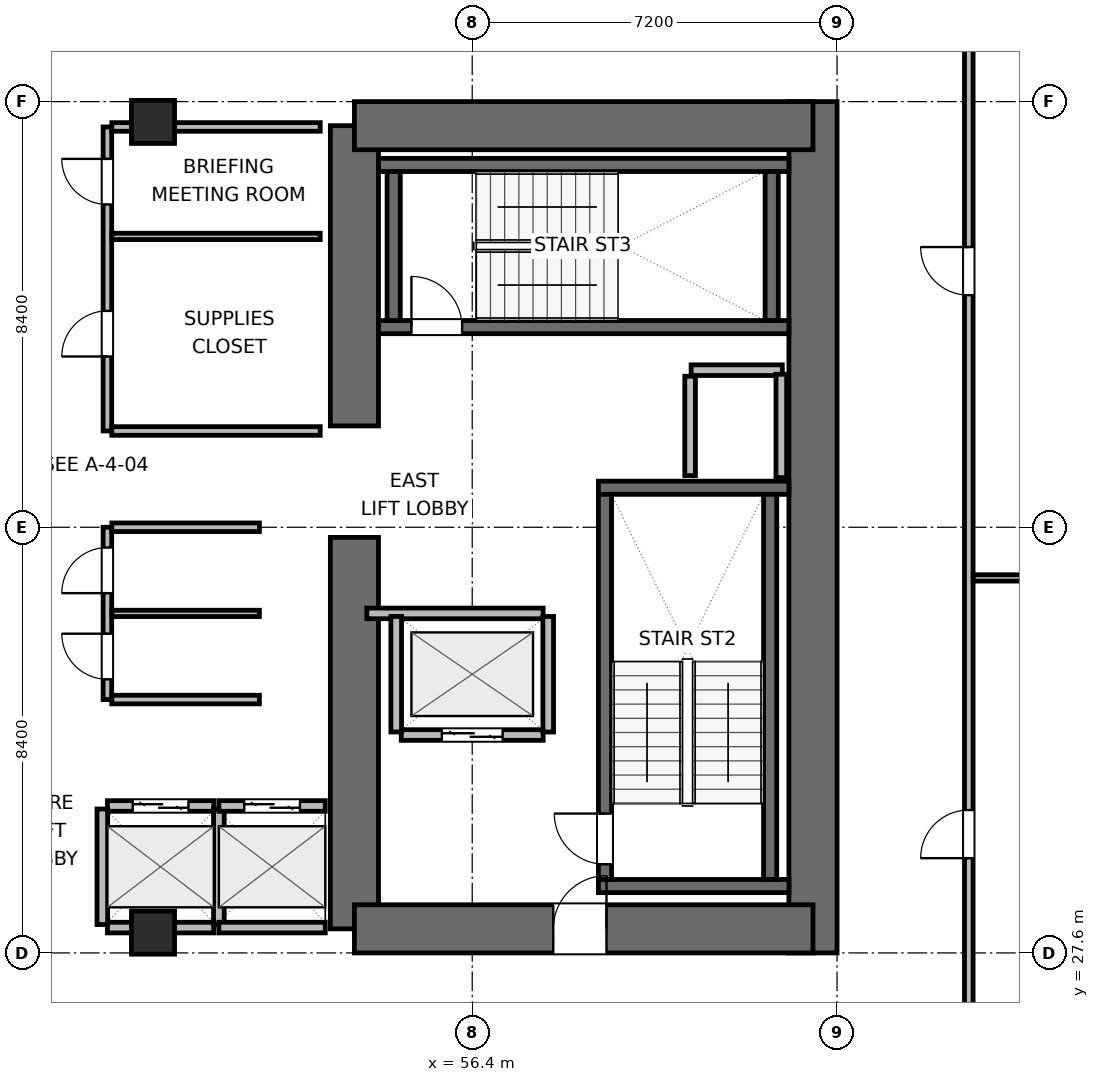
"""IFC4 building model, lengths in metres.
Left out: names, types, materials, properties, quantities, classifications, styles, units other than length and angle.
Written with IfcOpenShell. Run it as: python <this file> out.ifc"""

import sys

from ifc_helpers import new_model, si_unit, direction, frame, frame_2d, origin, origin_2d, place, context, subcontext, project, spatial, rectangle, extrude, element, fill, save


model = new_model("IFC4")
c1 = context("Model", 3, precision=1e-05, world=origin(), true_north=direction((0.0, 1.0)))
c2 = subcontext(c1, "Body", "Model", "MODEL_VIEW")
j1 = project(units=[si_unit("LENGTHUNIT", "METRE"), si_unit("PLANEANGLEUNIT", "RADIAN")], contexts=[c1])
p1 = place(None, origin())
s1 = spatial("IfcSite", under=j1, at=p1, CompositionType="ELEMENT")
p2 = place(p1, origin())
s2 = spatial("IfcBuilding", under=s1, at=p2, CompositionType="ELEMENT")
p3 = place(p2, frame((0.0, 0.0, 52.8)))
s3 = spatial("IfcBuildingStorey", under=s2, at=p3, CompositionType="ELEMENT", Elevation=52.8)
p4 = place(p3, frame((54.075, 28.075, 0.0), z_axis=(0.0, 0.0, 1.0), x_axis=(0.0, 1.0, 0.0)))
e1 = element("IfcWall", 1, at=p4, inside=s3, PredefinedType="SHEAR", context=c2, shape_type="SweptSolid", body=[
    extrude(rectangle(XDim=7.725, YDim=0.95, at=frame_2d((3.863, 0.0))), origin(), (0.0, 0.0, 1.0), 3.9),
])
p5 = place(p3, frame((54.075, 38.0, 0.0), z_axis=(0.0, 0.0, 1.0), x_axis=(0.0, 1.0, 0.0)))
e2 = element("IfcWall", 2, at=p5, inside=s3, PredefinedType="SHEAR", context=c2, shape_type="SweptSolid", body=[
    extrude(rectangle(XDim=5.925, YDim=0.95, at=frame_2d((2.962, 0.0))), origin(), (0.0, 0.0, 1.0), 3.9),
])
p6 = place(p3, frame((63.125, 27.6, 0.0), z_axis=(0.0, 0.0, 1.0), x_axis=(0.0, 1.0, 0.0)))
e3 = element("IfcWall", 3, at=p6, inside=s3, PredefinedType="SHEAR", context=c2, shape_type="SweptSolid", body=[
    extrude(rectangle(XDim=16.8, YDim=0.95, at=frame_2d((8.4, 0.0))), origin(), (0.0, 0.0, 1.0), 3.9),
])
p7 = place(p3, frame((54.075, 28.075, 0.0), z_axis=(0.0, 0.0, 1.0), x_axis=(1.0, 0.0, 0.0)))
e4 = element("IfcWall", 4, at=p7, inside=s3, PredefinedType="SHEAR", context=c2, shape_type="SweptSolid", body=[
    extrude(rectangle(XDim=9.05, YDim=0.95, at=frame_2d((4.525, 0.0))), origin(), (0.0, 0.0, 1.0), 3.9),
])
p8 = place(p7, frame((3.925, 0.0, 0.0)))
e5 = element("IfcOpeningElement", 5, at=p8, cuts=e4, PredefinedType="OPENING", context=c2, shape_type="SweptSolid", body=[
    extrude(rectangle(XDim=1.05, YDim=2.04, at=frame_2d((0.525, 1.02))), frame((0.0, 0.485, 0.0), z_axis=(0.0, -1.0, 0.0), x_axis=(1.0, 0.0, 0.0)), (0.0, 0.0, 1.0), 0.97),
])
p9 = place(p3, frame((54.075, 43.925, 0.0), z_axis=(0.0, 0.0, 1.0), x_axis=(1.0, 0.0, 0.0)))
e6 = element("IfcWall", 6, at=p9, inside=s3, PredefinedType="SHEAR", context=c2, shape_type="SweptSolid", body=[
    extrude(rectangle(XDim=9.05, YDim=0.95, at=frame_2d((4.525, 0.0))), origin(), (0.0, 0.0, 1.0), 3.9),
])
for number, where, z_axis, x_axis in (
    (7, (58.89, 28.92, 0.0), (0.0, 0.0, 1.0), (1.0, 0.0, 0.0)),
    (8, (58.89, 36.78, 0.0), (0.0, 0.0, 1.0), (1.0, 0.0, 0.0)),
):
    element("IfcWall", number, at=place(p3, frame(where, z_axis=z_axis, x_axis=x_axis)), inside=s3, PredefinedType="SHEAR", context=c2, shape_type="SweptSolid", body=[
        extrude(rectangle(XDim=3.76, YDim=0.26, at=frame_2d((1.88, 0.0))), origin(), (0.0, 0.0, 1.0), 3.9),
    ])
p10 = place(p3, frame((59.02, 29.05, 0.0), z_axis=(0.0, 0.0, 1.0), x_axis=(0.0, 1.0, 0.0)))
e9 = element("IfcWall", 9, at=p10, inside=s3, PredefinedType="SHEAR", context=c2, shape_type="SweptSolid", body=[
    extrude(rectangle(XDim=7.6, YDim=0.26, at=frame_2d((3.8, 0.0))), origin(), (0.0, 0.0, 1.0), 3.9),
])
p11 = place(p10, frame((0.3, 0.0, 0.0)))
e10 = element("IfcOpeningElement", 10, at=p11, cuts=e9, PredefinedType="OPENING", context=c2, shape_type="SweptSolid", body=[
    extrude(rectangle(XDim=1.0, YDim=2.04, at=frame_2d((0.5, 1.02))), frame((0.0, 0.14, 0.0), z_axis=(0.0, -1.0, 0.0), x_axis=(1.0, 0.0, 0.0)), (0.0, 0.0, 1.0), 0.28),
])
p12 = place(p3, frame((62.28, 29.05, 0.0), z_axis=(0.0, 0.0, 1.0), x_axis=(0.0, 1.0, 0.0)))
e11 = element("IfcWall", 11, at=p12, inside=s3, PredefinedType="SHEAR", context=c2, shape_type="SweptSolid", body=[
    extrude(rectangle(XDim=7.6, YDim=0.26, at=frame_2d((3.8, 0.0))), origin(), (0.0, 0.0, 1.0), 3.9),
])
p13 = place(p3, frame((54.55, 39.95, 0.0), z_axis=(0.0, 0.0, 1.0), x_axis=(1.0, 0.0, 0.0)))
e12 = element("IfcWall", 12, at=p13, inside=s3, PredefinedType="SHEAR", context=c2, shape_type="SweptSolid", body=[
    extrude(rectangle(XDim=8.1, YDim=0.26, at=frame_2d((4.05, 0.0))), origin(), (0.0, 0.0, 1.0), 3.9),
])
p14 = place(p13, frame((0.65, 0.0, 0.0)))
e13 = element("IfcOpeningElement", 13, at=p14, cuts=e12, PredefinedType="OPENING", context=c2, shape_type="SweptSolid", body=[
    extrude(rectangle(XDim=1.0, YDim=2.04, at=frame_2d((0.5, 1.02))), frame((0.0, 0.14, 0.0), z_axis=(0.0, -1.0, 0.0), x_axis=(1.0, 0.0, 0.0)), (0.0, 0.0, 1.0), 0.28),
])
p15 = place(p3, frame((54.55, 43.15, 0.0), z_axis=(0.0, 0.0, 1.0), x_axis=(1.0, 0.0, 0.0)))
e14 = element("IfcWall", 14, at=p15, inside=s3, PredefinedType="SHEAR", context=c2, shape_type="SweptSolid", body=[
    extrude(rectangle(XDim=8.1, YDim=0.26, at=frame_2d((4.05, 0.0))), origin(), (0.0, 0.0, 1.0), 3.9),
])
for number, where, z_axis, x_axis in (
    (15, (54.85, 40.08, 0.0), (0.0, 0.0, 1.0), (0.0, 1.0, 0.0)),
    (16, (62.31, 40.08, 0.0), (0.0, 0.0, 1.0), (0.0, 1.0, 0.0)),
):
    element("IfcWall", number, at=place(p3, frame(where, z_axis=z_axis, x_axis=x_axis)), inside=s3, PredefinedType="SHEAR", context=c2, shape_type="SweptSolid", body=[
        extrude(rectangle(XDim=2.94, YDim=0.26, at=frame_2d((1.47, 0.0))), origin(), (0.0, 0.0, 1.0), 3.9),
    ])
for number, where, z_axis, x_axis in (
    (17, (50.1, 28.0, 0.0), (0.0, 0.0, 1.0), (1.0, 0.0, 0.0)),
    (18, (50.1, 44.0, 0.0), (0.0, 0.0, 1.0), (1.0, 0.0, 0.0)),
):
    element("IfcColumn", number, at=place(p3, frame(where, z_axis=z_axis, x_axis=x_axis)), inside=s3, PredefinedType="COLUMN", context=c2, shape_type="SweptSolid", body=[
        extrude(rectangle(XDim=0.85, YDim=0.85, at=origin_2d()), origin(), (0.0, 0.0, 1.0), 3.9),
    ])
p16 = place(p3, frame((60.72, 39.1, 0.0), z_axis=(0.0, 0.0, 1.0), x_axis=(1.0, 0.0, 0.0)))
e19 = element("IfcWall", 19, at=p16, inside=s3, PredefinedType="PARTITIONING", context=c2, shape_type="SweptSolid", body=[
    extrude(rectangle(XDim=1.8, YDim=0.21, at=frame_2d((0.9, 0.0))), origin(), (0.0, 0.0, 1.0), 3.64),
])
p17 = place(p3, frame((60.7, 37.02, 0.0), z_axis=(0.0, 0.0, 1.0), x_axis=(0.0, 1.0, 0.0)))
e20 = element("IfcWall", 20, at=p17, inside=s3, PredefinedType="PARTITIONING", context=c2, shape_type="SweptSolid", body=[
    extrude(rectangle(XDim=1.96, YDim=0.21, at=frame_2d((0.98, 0.0))), origin(), (0.0, 0.0, 1.0), 3.64),
])
p18 = place(p3, frame((62.5, 36.98, 0.0), z_axis=(0.0, 0.0, 1.0), x_axis=(0.0, 1.0, 0.0)))
e21 = element("IfcWall", 21, at=p18, inside=s3, PredefinedType="PARTITIONING", context=c2, shape_type="SweptSolid", body=[
    extrude(rectangle(XDim=2.04, YDim=0.21, at=frame_2d((1.02, 0.0))), origin(), (0.0, 0.0, 1.0), 3.64),
])
p19 = place(p3, frame((55.0, 31.9, 0.0), z_axis=(0.0, 0.0, 1.0), x_axis=(1.0, 0.0, 0.0)))
e22 = element("IfcWall", 22, at=p19, inside=s3, PredefinedType="PARTITIONING", context=c2, shape_type="SweptSolid", body=[
    extrude(rectangle(XDim=2.8, YDim=0.21, at=frame_2d((1.4, 0.0))), origin(), (0.0, 0.0, 1.0), 3.64),
])
p20 = place(p19, frame((0.8, 0.0, 0.0)))
e23 = element("IfcOpeningElement", 23, at=p20, cuts=e22, PredefinedType="OPENING", context=c2, shape_type="SweptSolid", body=[
    extrude(rectangle(XDim=1.2, YDim=2.04, at=frame_2d((0.6, 1.02))), frame((0.0, 0.115, 0.0), z_axis=(0.0, -1.0, 0.0), x_axis=(1.0, 0.0, 0.0)), (0.0, 0.0, 1.0), 0.23),
])
p21 = place(p3, frame((54.32, 34.3, 0.0), z_axis=(0.0, 0.0, 1.0), x_axis=(1.0, 0.0, 0.0)))
e24 = element("IfcWall", 24, at=p21, inside=s3, PredefinedType="PARTITIONING", context=c2, shape_type="SweptSolid", body=[
    extrude(rectangle(XDim=3.48, YDim=0.21, at=frame_2d((1.74, 0.0))), origin(), (0.0, 0.0, 1.0), 3.64),
])
for number, where, z_axis, x_axis in (
    (25, (54.9, 31.96, 0.0), (0.0, 0.0, 1.0), (0.0, 1.0, 0.0)),
    (26, (57.9, 31.96, 0.0), (0.0, 0.0, 1.0), (0.0, 1.0, 0.0)),
):
    element("IfcWall", number, at=place(p3, frame(where, z_axis=z_axis, x_axis=x_axis)), inside=s3, PredefinedType="PARTITIONING", context=c2, shape_type="SweptSolid", body=[
        extrude(rectangle(XDim=2.28, YDim=0.21, at=frame_2d((1.14, 0.0))), origin(), (0.0, 0.0, 1.0), 3.64),
    ])
p22 = place(p3, frame((49.2, 30.5, 0.0), z_axis=(0.0, 0.0, 1.0), x_axis=(1.0, 0.0, 0.0)))
e27 = element("IfcWall", 27, at=p22, inside=s3, PredefinedType="PARTITIONING", context=c2, shape_type="SweptSolid", body=[
    extrude(rectangle(XDim=2.1, YDim=0.21, at=frame_2d((1.05, 0.0))), origin(), (0.0, 0.0, 1.0), 3.64),
])
p23 = place(p22, frame((0.5, 0.0, 0.0)))
e28 = element("IfcOpeningElement", 28, at=p23, cuts=e27, PredefinedType="OPENING", context=c2, shape_type="SweptSolid", body=[
    extrude(rectangle(XDim=1.1, YDim=2.04, at=frame_2d((0.55, 1.02))), frame((0.0, 0.115, 0.0), z_axis=(0.0, -1.0, 0.0), x_axis=(1.0, 0.0, 0.0)), (0.0, 0.0, 1.0), 0.23),
])
p24 = place(p3, frame((49.2, 28.1, 0.0), z_axis=(0.0, 0.0, 1.0), x_axis=(1.0, 0.0, 0.0)))
e29 = element("IfcWall", 29, at=p24, inside=s3, PredefinedType="PARTITIONING", context=c2, shape_type="SweptSolid", body=[
    extrude(rectangle(XDim=2.1, YDim=0.21, at=frame_2d((1.05, 0.0))), origin(), (0.0, 0.0, 1.0), 2.525),
])
for number, where, z_axis, x_axis in (
    (30, (49.1, 28.16, 0.0), (0.0, 0.0, 1.0), (0.0, 1.0, 0.0)),
    (31, (51.4, 28.16, 0.0), (0.0, 0.0, 1.0), (0.0, 1.0, 0.0)),
):
    element("IfcWall", number, at=place(p3, frame(where, z_axis=z_axis, x_axis=x_axis)), inside=s3, PredefinedType="PARTITIONING", context=c2, shape_type="SweptSolid", body=[
        extrude(rectangle(XDim=2.28, YDim=0.21, at=frame_2d((1.14, 0.0))), origin(), (0.0, 0.0, 1.0), 3.64),
    ])
p25 = place(p3, frame((51.4, 30.5, 0.0), z_axis=(0.0, 0.0, 1.0), x_axis=(1.0, 0.0, 0.0)))
e32 = element("IfcWall", 32, at=p25, inside=s3, PredefinedType="PARTITIONING", context=c2, shape_type="SweptSolid", body=[
    extrude(rectangle(XDim=2.1, YDim=0.21, at=frame_2d((1.05, 0.0))), origin(), (0.0, 0.0, 1.0), 3.64),
])
p26 = place(p25, frame((0.5, 0.0, 0.0)))
e33 = element("IfcOpeningElement", 33, at=p26, cuts=e32, PredefinedType="OPENING", context=c2, shape_type="SweptSolid", body=[
    extrude(rectangle(XDim=1.1, YDim=2.04, at=frame_2d((0.55, 1.02))), frame((0.0, 0.115, 0.0), z_axis=(0.0, -1.0, 0.0), x_axis=(1.0, 0.0, 0.0)), (0.0, 0.0, 1.0), 0.23),
])
p27 = place(p3, frame((51.4, 28.1, 0.0), z_axis=(0.0, 0.0, 1.0), x_axis=(1.0, 0.0, 0.0)))
e34 = element("IfcWall", 34, at=p27, inside=s3, PredefinedType="PARTITIONING", context=c2, shape_type="SweptSolid", body=[
    extrude(rectangle(XDim=2.1, YDim=0.21, at=frame_2d((1.05, 0.0))), origin(), (0.0, 0.0, 1.0), 2.525),
])
p28 = place(p3, frame((49.2, 32.6, 0.0), z_axis=(0.0, 0.0, 1.0), x_axis=(0.0, 1.0, 0.0)))
e35 = element("IfcWall", 35, at=p28, inside=s3, PredefinedType="PARTITIONING", context=c2, shape_type="SweptSolid", body=[
    extrude(rectangle(XDim=3.4, YDim=0.17, at=frame_2d((1.7, 0.0))), origin(), (0.0, 0.0, 1.0), 3.64),
])
p29 = place(p28, frame((0.4, 0.0, 0.0)))
e36 = element("IfcOpeningElement", 36, at=p29, cuts=e35, PredefinedType="OPENING", context=c2, shape_type="SweptSolid", body=[
    extrude(rectangle(XDim=0.9, YDim=2.02, at=frame_2d((0.45, 1.01))), frame((0.0, 0.095, 0.0), z_axis=(0.0, -1.0, 0.0), x_axis=(1.0, 0.0, 0.0)), (0.0, 0.0, 1.0), 0.19),
])
p30 = place(p28, frame((2.1, 0.0, 0.0)))
e37 = element("IfcOpeningElement", 37, at=p30, cuts=e35, PredefinedType="OPENING", context=c2, shape_type="SweptSolid", body=[
    extrude(rectangle(XDim=0.9, YDim=2.02, at=frame_2d((0.45, 1.01))), frame((0.0, 0.095, 0.0), z_axis=(0.0, -1.0, 0.0), x_axis=(1.0, 0.0, 0.0)), (0.0, 0.0, 1.0), 0.19),
])
for number, where, z_axis, x_axis in (
    (38, (49.287, 32.6, 0.0), (0.0, 0.0, 1.0), (1.0, 0.0, 0.0)),
    (39, (49.287, 36.0, 0.0), (0.0, 0.0, 1.0), (1.0, 0.0, 0.0)),
):
    element("IfcWall", number, at=place(p3, frame(where, z_axis=z_axis, x_axis=x_axis)), inside=s3, PredefinedType="PARTITIONING", context=c2, shape_type="SweptSolid", body=[
        extrude(rectangle(XDim=2.913, YDim=0.17, at=frame_2d((1.457, 0.0))), origin(), (0.0, 0.0, 1.0), 3.64),
    ])
p31 = place(p3, frame((49.287, 34.3, 0.0), z_axis=(0.0, 0.0, 1.0), x_axis=(1.0, 0.0, 0.0)))
e40 = element("IfcWall", 40, at=p31, inside=s3, PredefinedType="PARTITIONING", context=c2, shape_type="SweptSolid", body=[
    extrude(rectangle(XDim=2.913, YDim=0.125, at=frame_2d((1.457, 0.0))), origin(), (0.0, 0.0, 1.0), 3.64),
])
p32 = place(p3, frame((49.2, 37.9, 0.0), z_axis=(0.0, 0.0, 1.0), x_axis=(0.0, 1.0, 0.0)))
e41 = element("IfcWall", 41, at=p32, inside=s3, PredefinedType="PARTITIONING", context=c2, shape_type="SweptSolid", body=[
    extrude(rectangle(XDim=6.0, YDim=0.17, at=frame_2d((3.0, 0.0))), origin(), (0.0, 0.0, 1.0), 3.64),
])
p33 = place(p32, frame((1.47, 0.0, 0.0)))
e42 = element("IfcOpeningElement", 42, at=p33, cuts=e41, PredefinedType="OPENING", context=c2, shape_type="SweptSolid", body=[
    extrude(rectangle(XDim=0.9, YDim=2.02, at=frame_2d((0.45, 1.01))), frame((0.0, 0.095, 0.0), z_axis=(0.0, -1.0, 0.0), x_axis=(1.0, 0.0, 0.0)), (0.0, 0.0, 1.0), 0.19),
])
p34 = place(p32, frame((4.47, 0.0, 0.0)))
e43 = element("IfcOpeningElement", 43, at=p34, cuts=e41, PredefinedType="OPENING", context=c2, shape_type="SweptSolid", body=[
    extrude(rectangle(XDim=0.9, YDim=2.02, at=frame_2d((0.45, 1.01))), frame((0.0, 0.095, 0.0), z_axis=(0.0, -1.0, 0.0), x_axis=(1.0, 0.0, 0.0)), (0.0, 0.0, 1.0), 0.19),
])
p35 = place(p3, frame((49.287, 37.9, 0.0), z_axis=(0.0, 0.0, 1.0), x_axis=(1.0, 0.0, 0.0)))
e44 = element("IfcWall", 44, at=p35, inside=s3, PredefinedType="PARTITIONING", context=c2, shape_type="SweptSolid", body=[
    extrude(rectangle(XDim=4.113, YDim=0.17, at=frame_2d((2.056, 0.0))), origin(), (0.0, 0.0, 1.0), 3.64),
])
p36 = place(p3, frame((49.287, 43.9, 0.0), z_axis=(0.0, 0.0, 1.0), x_axis=(1.0, 0.0, 0.0)))
e45 = element("IfcWall", 45, at=p36, inside=s3, PredefinedType="PARTITIONING", context=c2, shape_type="SweptSolid", body=[
    extrude(rectangle(XDim=4.113, YDim=0.17, at=frame_2d((2.056, 0.0))), origin(), (0.0, 0.0, 1.0), 2.525),
])
p37 = place(p3, frame((49.287, 41.74, 0.0), z_axis=(0.0, 0.0, 1.0), x_axis=(1.0, 0.0, 0.0)))
e46 = element("IfcWall", 46, at=p37, inside=s3, PredefinedType="PARTITIONING", context=c2, shape_type="SweptSolid", body=[
    extrude(rectangle(XDim=4.113, YDim=0.125, at=frame_2d((2.056, 0.0))), origin(), (0.0, 0.0, 1.0), 3.64),
])
p38 = place(p3, frame((66.2, 24.977, 0.0), z_axis=(0.0, 0.0, 1.0), x_axis=(0.0, 1.0, 0.0)))
e47 = element("IfcWall", 47, at=p38, inside=s3, PredefinedType="PARTITIONING", context=c2, shape_type="SweptSolid", body=[
    extrude(rectangle(XDim=22.046, YDim=0.17, at=frame_2d((11.023, 0.0))), origin(), (0.0, 0.0, 1.0), 3.64),
])
p39 = place(p38, frame((4.493, 0.0, 0.0)))
e48 = element("IfcOpeningElement", 48, at=p39, cuts=e47, PredefinedType="OPENING", context=c2, shape_type="SweptSolid", body=[
    extrude(rectangle(XDim=0.95, YDim=2.04, at=frame_2d((0.475, 1.02))), frame((0.0, 0.095, 0.0), z_axis=(0.0, -1.0, 0.0), x_axis=(1.0, 0.0, 0.0)), (0.0, 0.0, 1.0), 0.19),
])
p40 = place(p38, frame((15.603, 0.0, 0.0)))
e49 = element("IfcOpeningElement", 49, at=p40, cuts=e47, PredefinedType="OPENING", context=c2, shape_type="SweptSolid", body=[
    extrude(rectangle(XDim=0.95, YDim=2.04, at=frame_2d((0.475, 1.02))), frame((0.0, 0.095, 0.0), z_axis=(0.0, -1.0, 0.0), x_axis=(1.0, 0.0, 0.0)), (0.0, 0.0, 1.0), 0.19),
])
p41 = place(p3, frame((66.287, 35.0, 0.0), z_axis=(0.0, 0.0, 1.0), x_axis=(1.0, 0.0, 0.0)))
e50 = element("IfcWall", 50, at=p41, inside=s3, PredefinedType="PARTITIONING", context=c2, shape_type="SweptSolid", body=[
    extrude(rectangle(XDim=12.668, YDim=0.125, at=frame_2d((6.334, 0.0))), origin(), (0.0, 0.0, 1.0), 3.64),
])
p42 = place(p11, origin())
e51 = element("IfcDoor", 51, at=p42, inside=s3, OperationType="SINGLE_SWING_RIGHT", PredefinedType="DOOR", context=c2, shape_type="SweptSolid", body=[
    extrude(rectangle(XDim=1.0, YDim=2.04, at=frame_2d((0.5, 1.02))), frame((0.0, 0.025, 0.0), z_axis=(0.0, -1.0, 0.0), x_axis=(1.0, 0.0, 0.0)), (0.0, 0.0, 1.0), 0.05),
])
fill(e10, e51)
p43 = place(p14, origin())
e52 = element("IfcDoor", 52, at=p43, inside=s3, OperationType="SINGLE_SWING_LEFT", PredefinedType="DOOR", context=c2, shape_type="SweptSolid", body=[
    extrude(rectangle(XDim=1.0, YDim=2.04, at=frame_2d((0.5, 1.02))), frame((0.0, 0.025, 0.0), z_axis=(0.0, -1.0, 0.0), x_axis=(1.0, 0.0, 0.0)), (0.0, 0.0, 1.0), 0.05),
])
fill(e13, e52)
p44 = place(p20, origin())
e53 = element("IfcDoor", 53, at=p44, inside=s3, OperationType="DOUBLE_DOOR_SLIDING", PredefinedType="DOOR", context=c2, shape_type="SweptSolid", body=[
    extrude(rectangle(XDim=1.2, YDim=2.04, at=frame_2d((0.6, 1.02))), frame((0.0, 0.025, 0.0), z_axis=(0.0, -1.0, 0.0), x_axis=(1.0, 0.0, 0.0)), (0.0, 0.0, 1.0), 0.05),
])
fill(e23, e53)
p45 = place(p23, origin())
e54 = element("IfcDoor", 54, at=p45, inside=s3, OperationType="DOUBLE_DOOR_SLIDING", PredefinedType="DOOR", context=c2, shape_type="SweptSolid", body=[
    extrude(rectangle(XDim=1.1, YDim=2.04, at=frame_2d((0.55, 1.02))), frame((0.0, 0.025, 0.0), z_axis=(0.0, -1.0, 0.0), x_axis=(1.0, 0.0, 0.0)), (0.0, 0.0, 1.0), 0.05),
])
fill(e28, e54)
p46 = place(p26, origin())
e55 = element("IfcDoor", 55, at=p46, inside=s3, OperationType="DOUBLE_DOOR_SLIDING", PredefinedType="DOOR", context=c2, shape_type="SweptSolid", body=[
    extrude(rectangle(XDim=1.1, YDim=2.04, at=frame_2d((0.55, 1.02))), frame((0.0, 0.025, 0.0), z_axis=(0.0, -1.0, 0.0), x_axis=(1.0, 0.0, 0.0)), (0.0, 0.0, 1.0), 0.05),
])
fill(e33, e55)
p47 = place(p8, origin())
e56 = element("IfcDoor", 56, at=p47, inside=s3, OperationType="SINGLE_SWING_RIGHT", PredefinedType="DOOR", context=c2, shape_type="SweptSolid", body=[
    extrude(rectangle(XDim=1.05, YDim=2.04, at=frame_2d((0.525, 1.02))), frame((0.0, 0.025, 0.0), z_axis=(0.0, -1.0, 0.0), x_axis=(1.0, 0.0, 0.0)), (0.0, 0.0, 1.0), 0.05),
])
fill(e5, e56)
p48 = place(p29, origin())
e57 = element("IfcDoor", 57, at=p48, inside=s3, OperationType="SINGLE_SWING_RIGHT", PredefinedType="DOOR", context=c2, shape_type="SweptSolid", body=[
    extrude(rectangle(XDim=0.9, YDim=2.02, at=frame_2d((0.45, 1.01))), frame((0.0, 0.025, 0.0), z_axis=(0.0, -1.0, 0.0), x_axis=(1.0, 0.0, 0.0)), (0.0, 0.0, 1.0), 0.05),
])
fill(e36, e57)
p49 = place(p30, origin())
e58 = element("IfcDoor", 58, at=p49, inside=s3, OperationType="SINGLE_SWING_LEFT", PredefinedType="DOOR", context=c2, shape_type="SweptSolid", body=[
    extrude(rectangle(XDim=0.9, YDim=2.02, at=frame_2d((0.45, 1.01))), frame((0.0, 0.025, 0.0), z_axis=(0.0, -1.0, 0.0), x_axis=(1.0, 0.0, 0.0)), (0.0, 0.0, 1.0), 0.05),
])
fill(e37, e58)
p50 = place(p33, origin())
e59 = element("IfcDoor", 59, at=p50, inside=s3, OperationType="SINGLE_SWING_LEFT", PredefinedType="DOOR", context=c2, shape_type="SweptSolid", body=[
    extrude(rectangle(XDim=0.9, YDim=2.02, at=frame_2d((0.45, 1.01))), frame((0.0, 0.025, 0.0), z_axis=(0.0, -1.0, 0.0), x_axis=(1.0, 0.0, 0.0)), (0.0, 0.0, 1.0), 0.05),
])
fill(e42, e59)
p51 = place(p34, origin())
e60 = element("IfcDoor", 60, at=p51, inside=s3, OperationType="SINGLE_SWING_RIGHT", PredefinedType="DOOR", context=c2, shape_type="SweptSolid", body=[
    extrude(rectangle(XDim=0.9, YDim=2.02, at=frame_2d((0.45, 1.01))), frame((0.0, 0.025, 0.0), z_axis=(0.0, -1.0, 0.0), x_axis=(1.0, 0.0, 0.0)), (0.0, 0.0, 1.0), 0.05),
])
fill(e43, e60)
p52 = place(p39, origin())
e61 = element("IfcDoor", 61, at=p52, inside=s3, OperationType="SINGLE_SWING_LEFT", PredefinedType="DOOR", context=c2, shape_type="SweptSolid", body=[
    extrude(rectangle(XDim=0.95, YDim=2.04, at=frame_2d((0.475, 1.02))), frame((0.0, 0.025, 0.0), z_axis=(0.0, -1.0, 0.0), x_axis=(1.0, 0.0, 0.0)), (0.0, 0.0, 1.0), 0.05),
])
fill(e48, e61)
p53 = place(p40, origin())
e62 = element("IfcDoor", 62, at=p53, inside=s3, OperationType="SINGLE_SWING_RIGHT", PredefinedType="DOOR", context=c2, shape_type="SweptSolid", body=[
    extrude(rectangle(XDim=0.95, YDim=2.04, at=frame_2d((0.475, 1.02))), frame((0.0, 0.025, 0.0), z_axis=(0.0, -1.0, 0.0), x_axis=(1.0, 0.0, 0.0)), (0.0, 0.0, 1.0), 0.05),
])
fill(e49, e62)
save(model, sys.argv[1])
